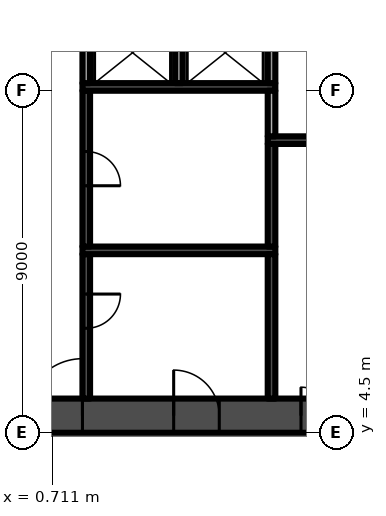
"""IFC4 building model, lengths in metres.
Left out: names, types, materials, properties, quantities, classifications, styles, units other than length and angle.
Written with IfcOpenShell. Run it as: python <this file> out.ifc"""

import sys

from ifc_helpers import new_model, si_unit, direction, frame, frame_2d, origin, place, context, subcontext, project, spatial, rectangle, extrude, element, fill, save


model = new_model("IFC4")
c1 = context("Model", 3, precision=1e-05, world=origin(), true_north=direction((0.0, 1.0)))
c2 = subcontext(c1, "Body", "Model", "MODEL_VIEW")
j1 = project(units=[si_unit("LENGTHUNIT", "METRE"), si_unit("PLANEANGLEUNIT", "RADIAN")], contexts=[c1])
p1 = place(None, origin())
s1 = spatial("IfcSite", under=j1, at=p1, CompositionType="ELEMENT")
p2 = place(p1, origin())
s2 = spatial("IfcBuilding", under=s1, at=p2, CompositionType="ELEMENT")
p3 = place(p2, origin())
s3 = spatial("IfcBuildingStorey", under=s2, at=p3, CompositionType="ELEMENT", Elevation=0.0)
p4 = place(p3, frame((-13.5, 4.95, -2.2), z_axis=(0.0, 0.0, 1.0), x_axis=(1.0, 0.0, 0.0)))
e1 = element("IfcWall", 1, at=p4, inside=s3, PredefinedType="SHEAR", context=c2, shape_type="SweptSolid", body=[
    extrude(rectangle(XDim=27.0, YDim=0.9, at=frame_2d((13.5, 0.0))), origin(), (0.0, 0.0, 1.0), 7.8),
])
p5 = place(p4, frame((12.0, 0.0, 2.2)))
e2 = element("IfcOpeningElement", 2, at=p5, cuts=e1, PredefinedType="OPENING", context=c2, shape_type="SweptSolid", body=[
    extrude(rectangle(XDim=3.0, YDim=2.4, at=frame_2d((1.5, 1.2))), frame((0.0, 0.46, 0.0), z_axis=(0.0, -1.0, 0.0), x_axis=(1.0, 0.0, 0.0)), (0.0, 0.0, 1.0), 0.92),
])
p6 = place(p4, frame((4.9, 0.0, 2.2)))
e3 = element("IfcOpeningElement", 3, at=p6, cuts=e1, PredefinedType="OPENING", context=c2, shape_type="SweptSolid", body=[
    extrude(rectangle(XDim=1.2, YDim=2.2, at=frame_2d((0.6, 1.1))), frame((0.0, 0.46, 0.0), z_axis=(0.0, -1.0, 0.0), x_axis=(1.0, 0.0, 0.0)), (0.0, 0.0, 1.0), 0.92),
])
p7 = place(p4, frame((20.75, 0.0, 2.2)))
e4 = element("IfcOpeningElement", 4, at=p7, cuts=e1, PredefinedType="OPENING", context=c2, shape_type="SweptSolid", body=[
    extrude(rectangle(XDim=1.5, YDim=2.2, at=frame_2d((0.75, 1.1))), frame((0.0, 0.46, 0.0), z_axis=(0.0, -1.0, 0.0), x_axis=(1.0, 0.0, 0.0)), (0.0, 0.0, 1.0), 0.92),
])
p8 = place(p4, frame((17.4, 0.0, 2.2)))
e5 = element("IfcOpeningElement", 5, at=p8, cuts=e1, PredefinedType="OPENING", context=c2, shape_type="SweptSolid", body=[
    extrude(rectangle(XDim=1.2, YDim=2.2, at=frame_2d((0.6, 1.1))), frame((0.0, 0.46, 0.0), z_axis=(0.0, -1.0, 0.0), x_axis=(1.0, 0.0, 0.0)), (0.0, 0.0, 1.0), 0.92),
])
p9 = place(p3, frame((1.6, 9.2, -0.4), z_axis=(0.0, 0.0, 1.0), x_axis=(0.0, -1.0, 0.0)))
e6 = element("IfcWall", 6, at=p9, inside=s3, PredefinedType="SHEAR", context=c2, shape_type="SweptSolid", body=[
    extrude(rectangle(XDim=3.8, YDim=0.2, at=frame_2d((1.9, 0.0))), origin(), (0.0, 0.0, 1.0), 6.0),
])
p10 = place(p9, frame((1.05, 0.0, 0.4)))
e7 = element("IfcOpeningElement", 7, at=p10, cuts=e6, PredefinedType="OPENING", context=c2, shape_type="SweptSolid", body=[
    extrude(rectangle(XDim=0.9, YDim=2.1, at=frame_2d((0.45, 1.05))), frame((0.0, 0.11, 0.0), z_axis=(0.0, -1.0, 0.0), x_axis=(1.0, 0.0, 0.0)), (0.0, 0.0, 1.0), 0.22),
])
p11 = place(p3, frame((1.5, 9.3, -0.4), z_axis=(0.0, 0.0, 1.0), x_axis=(1.0, 0.0, 0.0)))
e8 = element("IfcWall", 8, at=p11, inside=s3, PredefinedType="SHEAR", context=c2, shape_type="SweptSolid", body=[
    extrude(rectangle(XDim=5.075, YDim=0.2, at=frame_2d((2.538, 0.0))), origin(), (0.0, 0.0, 1.0), 6.0),
])
p12 = place(p3, frame((1.6, 13.5, -0.4), z_axis=(0.0, 0.0, 1.0), x_axis=(0.0, -1.0, 0.0)))
e9 = element("IfcWall", 9, at=p12, inside=s3, PredefinedType="SHEAR", context=c2, shape_type="SweptSolid", body=[
    extrude(rectangle(XDim=4.1, YDim=0.2, at=frame_2d((2.05, 0.0))), origin(), (0.0, 0.0, 1.0), 6.0),
])
p13 = place(p12, frame((1.6, 0.0, 0.4)))
e10 = element("IfcOpeningElement", 10, at=p13, cuts=e9, PredefinedType="OPENING", context=c2, shape_type="SweptSolid", body=[
    extrude(rectangle(XDim=0.9, YDim=2.1, at=frame_2d((0.45, 1.05))), frame((0.0, 0.11, 0.0), z_axis=(0.0, -1.0, 0.0), x_axis=(1.0, 0.0, 0.0)), (0.0, 0.0, 1.0), 0.22),
])
p14 = place(p3, frame((1.5, 13.6, -0.4), z_axis=(0.0, 0.0, 1.0), x_axis=(1.0, 0.0, 0.0)))
e11 = element("IfcWall", 11, at=p14, inside=s3, PredefinedType="SHEAR", context=c2, shape_type="SweptSolid", body=[
    extrude(rectangle(XDim=5.075, YDim=0.2, at=frame_2d((2.538, 0.0))), origin(), (0.0, 0.0, 1.0), 6.0),
])
for number, where, z_axis, x_axis in (
    (12, (1.6, 13.7, -0.4), (0.0, 0.0, 1.0), (0.0, 1.0, 0.0)),
    (13, (4.037, 13.7, -0.4), (0.0, 0.0, 1.0), (0.0, 1.0, 0.0)),
):
    element("IfcWall", number, at=place(p3, frame(where, z_axis=z_axis, x_axis=x_axis)), inside=s3, PredefinedType="PARTITIONING", context=c2, shape_type="SweptSolid", body=[
        extrude(rectangle(XDim=2.2, YDim=0.2, at=frame_2d((1.1, 0.0))), origin(), (0.0, 0.0, 1.0), 6.0),
    ])
p15 = place(p3, frame((6.475, 5.4, -0.4), z_axis=(0.0, 0.0, 1.0), x_axis=(0.0, 1.0, 0.0)))
e14 = element("IfcWall", 14, at=p15, inside=s3, PredefinedType="SHEAR", context=c2, shape_type="SweptSolid", body=[
    extrude(rectangle(XDim=3.8, YDim=0.2, at=frame_2d((1.9, 0.0))), origin(), (0.0, 0.0, 1.0), 6.0),
])
p16 = place(p3, frame((6.475, 9.4, -0.4), z_axis=(0.0, 0.0, 1.0), x_axis=(0.0, 1.0, 0.0)))
e15 = element("IfcWall", 15, at=p16, inside=s3, PredefinedType="SHEAR", context=c2, shape_type="SweptSolid", body=[
    extrude(rectangle(XDim=2.7, YDim=0.2, at=frame_2d((1.35, 0.0))), origin(), (0.0, 0.0, 1.0), 6.0),
])
p17 = place(p3, frame((6.375, 12.2, -0.4), z_axis=(0.0, 0.0, 1.0), x_axis=(1.0, 0.0, 0.0)))
e16 = element("IfcWall", 16, at=p17, inside=s3, PredefinedType="SHEAR", context=c2, shape_type="SweptSolid", body=[
    extrude(rectangle(XDim=3.475, YDim=0.2, at=frame_2d((1.738, 0.0))), origin(), (0.0, 0.0, 1.0), 6.0),
])
p18 = place(p3, frame((6.475, 12.3, 0.0), z_axis=(0.0, 0.0, 1.0), x_axis=(0.0, 1.0, 0.0)))
e17 = element("IfcWall", 17, at=p18, inside=s3, PredefinedType="PARTITIONING", context=c2, shape_type="SweptSolid", body=[
    extrude(rectangle(XDim=1.2, YDim=0.2, at=frame_2d((0.6, 0.0))), origin(), (0.0, 0.0, 1.0), 5.6),
])
p19 = place(p3, frame((6.475, 13.7, -0.4), z_axis=(0.0, 0.0, 1.0), x_axis=(0.0, 1.0, 0.0)))
e18 = element("IfcWall", 18, at=p19, inside=s3, PredefinedType="PARTITIONING", context=c2, shape_type="SweptSolid", body=[
    extrude(rectangle(XDim=2.2, YDim=0.2, at=frame_2d((1.1, 0.0))), origin(), (0.0, 0.0, 1.0), 6.0),
])
p20 = place(p5, frame((3.0, 0.0, 0.0), z_axis=(0.0, 0.0, 1.0), x_axis=(-1.0, 0.0, 0.0)))
e19 = element("IfcDoor", 19, at=p20, inside=s3, OperationType="DOUBLE_DOOR_SINGLE_SWING", PredefinedType="DOOR", context=c2, shape_type="SweptSolid", body=[
    extrude(rectangle(XDim=3.0, YDim=2.4, at=frame_2d((1.5, 1.2))), frame((0.0, 0.025, 0.0), z_axis=(0.0, -1.0, 0.0), x_axis=(1.0, 0.0, 0.0)), (0.0, 0.0, 1.0), 0.05),
])
fill(e2, e19)
p21 = place(p7, frame((1.5, 0.0, 0.0), z_axis=(0.0, 0.0, 1.0), x_axis=(-1.0, 0.0, 0.0)))
e20 = element("IfcDoor", 20, at=p21, inside=s3, OperationType="DOUBLE_DOOR_SINGLE_SWING", PredefinedType="DOOR", context=c2, shape_type="SweptSolid", body=[
    extrude(rectangle(XDim=1.5, YDim=2.2, at=frame_2d((0.75, 1.1))), frame((0.0, 0.025, 0.0), z_axis=(0.0, -1.0, 0.0), x_axis=(1.0, 0.0, 0.0)), (0.0, 0.0, 1.0), 0.05),
])
fill(e4, e20)
p22 = place(p8, frame((1.2, 0.0, 0.0), z_axis=(0.0, 0.0, 1.0), x_axis=(-1.0, 0.0, 0.0)))
e21 = element("IfcDoor", 21, at=p22, inside=s3, OperationType="SINGLE_SWING_RIGHT", PredefinedType="DOOR", context=c2, shape_type="SweptSolid", body=[
    extrude(rectangle(XDim=1.2, YDim=2.2, at=frame_2d((0.6, 1.1))), frame((0.0, 0.025, 0.0), z_axis=(0.0, -1.0, 0.0), x_axis=(1.0, 0.0, 0.0)), (0.0, 0.0, 1.0), 0.05),
])
fill(e5, e21)
p23 = place(p10, origin())
e22 = element("IfcDoor", 22, at=p23, inside=s3, OperationType="SINGLE_SWING_LEFT", PredefinedType="DOOR", context=c2, shape_type="SweptSolid", body=[
    extrude(rectangle(XDim=0.9, YDim=2.1, at=frame_2d((0.45, 1.05))), frame((0.0, 0.025, 0.0), z_axis=(0.0, -1.0, 0.0), x_axis=(1.0, 0.0, 0.0)), (0.0, 0.0, 1.0), 0.05),
])
fill(e7, e22)
p24 = place(p13, origin())
e23 = element("IfcDoor", 23, at=p24, inside=s3, OperationType="SINGLE_SWING_RIGHT", PredefinedType="DOOR", context=c2, shape_type="SweptSolid", body=[
    extrude(rectangle(XDim=0.9, YDim=2.1, at=frame_2d((0.45, 1.05))), frame((0.0, 0.025, 0.0), z_axis=(0.0, -1.0, 0.0), x_axis=(1.0, 0.0, 0.0)), (0.0, 0.0, 1.0), 0.05),
])
fill(e10, e23)
save(model, sys.argv[1])
